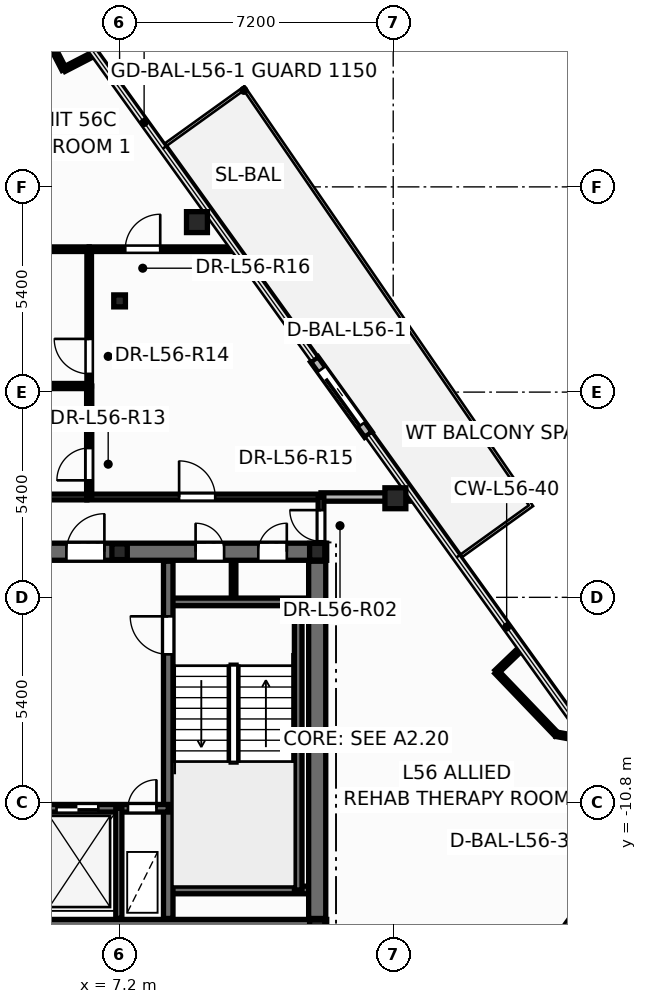
"""IFC4 building model, lengths in metres.
Left out: names, types, materials, properties, quantities, classifications, styles, units other than length and angle.
Written with IfcOpenShell. Run it as: python <this file> out.ifc"""

import sys

from ifc_helpers import new_model, si_unit, direction, frame, frame_2d, origin, origin_2d, place, context, subcontext, project, spatial, rectangle, hollow_circle, i_section, extrude, element, fill, save


model = new_model("IFC4")
c1 = context("Model", 3, precision=1e-05, world=origin(), true_north=direction((0.0, 1.0)))
c2 = subcontext(c1, "Body", "Model", "MODEL_VIEW")
j1 = project(units=[si_unit("LENGTHUNIT", "METRE"), si_unit("PLANEANGLEUNIT", "RADIAN")], contexts=[c1])
p1 = place(None, origin())
s1 = spatial("IfcSite", under=j1, at=p1, CompositionType="ELEMENT")
p2 = place(p1, origin())
s2 = spatial("IfcBuilding", under=s1, at=p2, CompositionType="ELEMENT")
p3 = place(p2, frame((0.0, 0.0, 214.5)))
s3 = spatial("IfcBuildingStorey", under=s2, at=p3, CompositionType="ELEMENT", Elevation=214.5)
for number, where, z_axis, x_axis in (
    (1, (14.457, -2.793, 0.0), (0.0, 0.0, 1.0), (1.0, 0.0, 0.0)),
    (2, (9.236, 4.473, 0.0), (0.0, 0.0, 1.0), (1.0, 0.0, 0.0)),
):
    element("IfcColumn", number, at=place(p3, frame(where, z_axis=z_axis, x_axis=x_axis)), inside=s3, PredefinedType="COLUMN", context=c2, shape_type="SweptSolid", body=[
        extrude(hollow_circle(Radius=0.275, WallThickness=0.024, at=origin_2d()), origin(), (0.0, 0.0, 1.0), 3.6),
    ])
for number, where, z_axis, x_axis in (
    (3, (12.4, -14.1, 0.0), (0.0, 0.0, 1.0), (1.0, 0.0, 0.0)),
    (4, (12.4, -4.2, 0.0), (0.0, 0.0, 1.0), (1.0, 0.0, 0.0)),
):
    element("IfcColumn", number, at=place(p3, frame(where, z_axis=z_axis, x_axis=x_axis)), inside=s3, PredefinedType="COLUMN", context=c2, shape_type="SweptSolid", body=[
        extrude(i_section(OverallWidth=0.4, OverallDepth=0.44, WebThickness=0.028, FlangeThickness=0.04, at=origin_2d()), origin(), (0.0, 0.0, 1.0), 3.6),
    ])
p4 = place(p3, frame((7.2, -4.2, 0.0), z_axis=(0.0, 0.0, 1.0), x_axis=(1.0, 0.0, 0.0)))
e5 = element("IfcColumn", 5, at=p4, inside=s3, PredefinedType="PILASTER", context=c2, shape_type="SweptSolid", body=[
    extrude(i_section(OverallWidth=0.405, OverallDepth=0.414, WebThickness=0.022, FlangeThickness=0.032, at=origin_2d()), origin(), (0.0, 0.0, 1.0), 3.6),
])
p5 = place(p3, frame((7.2, 2.4, 0.0), z_axis=(0.0, 0.0, 1.0), x_axis=(1.0, 0.0, 0.0)))
e6 = element("IfcColumn", 6, at=p5, inside=s3, PredefinedType="COLUMN", context=c2, shape_type="SweptSolid", body=[
    extrude(i_section(OverallWidth=0.307, OverallDepth=0.314, WebThickness=0.012, FlangeThickness=0.019, at=origin_2d()), origin(), (0.0, 0.0, 1.0), 3.6),
])
p6 = place(p3, frame((13.747, -1.12, -0.015), z_axis=(0.0, 0.0, 1.0), x_axis=(-0.58349791381, 0.812114637585, 0.0)))
e7 = element("IfcWall", 7, at=p6, inside=s3, PredefinedType="STANDARD", context=c2, shape_type="SweptSolid", body=[
    extrude(rectangle(XDim=2.44, YDim=0.24, at=frame_2d((1.22, 0.0))), origin(), (0.0, 0.0, 1.0), 2.802),
])
p7 = place(p6, frame((0.32, 0.0, 0.015)))
e8 = element("IfcOpeningElement", 8, at=p7, cuts=e7, PredefinedType="OPENING", context=c2, shape_type="SweptSolid", body=[
    extrude(rectangle(XDim=1.806, YDim=2.204, at=frame_2d((0.9, 1.102))), frame((0.0, 0.13, 0.0), z_axis=(0.0, -1.0, 0.0), x_axis=(1.0, 0.0, 0.0)), (0.0, 0.0, 1.0), 0.26),
])
p8 = place(p3, frame((17.739, -15.864, -0.015), z_axis=(0.0, 0.0, 1.0), x_axis=(0.5835494265, 0.812077623649, 0.0)))
e9 = element("IfcWall", 9, at=p8, inside=s3, PredefinedType="STANDARD", context=c2, shape_type="SweptSolid", body=[
    extrude(rectangle(XDim=3.833, YDim=0.24, at=frame_2d((1.917, 0.0))), origin(), (0.0, 0.0, 1.0), 2.802),
])
p9 = place(p8, frame((2.013, 0.0, 0.015)))
e10 = element("IfcOpeningElement", 10, at=p9, cuts=e9, PredefinedType="OPENING", context=c2, shape_type="SweptSolid", body=[
    extrude(rectangle(XDim=1.506, YDim=2.204, at=frame_2d((0.75, 1.102))), frame((0.0, 0.13, 0.0), z_axis=(0.0, -1.0, 0.0), x_axis=(1.0, 0.0, 0.0)), (0.0, 0.0, 1.0), 0.26),
])
p10 = place(p3, frame((10.2, -5.52, 0.0), z_axis=(0.0, 0.0, 1.0), x_axis=(0.0, 1.0, 0.0)))
e11 = element("IfcWall", 11, at=p10, inside=s3, PredefinedType="PARTITIONING", context=c2, shape_type="SweptSolid", body=[
    extrude(rectangle(XDim=1.12, YDim=0.12, at=frame_2d((0.56, 0.0))), origin(), (0.0, 0.0, 1.0), 3.345),
])
p11 = place(p3, frame((-12.65, -14.1, 0.0), z_axis=(0.0, 0.0, 1.0), x_axis=(1.0, 0.0, 0.0)))
e12 = element("IfcWall", 12, at=p11, inside=s3, PredefinedType="SHEAR", context=c2, shape_type="SweptSolid", body=[
    extrude(rectangle(XDim=25.3, YDim=0.45, at=frame_2d((12.65, 0.0))), origin(), (0.0, 0.0, 1.0), 3.6),
])
p12 = place(p3, frame((-12.65, -4.2, 0.0), z_axis=(0.0, 0.0, 1.0), x_axis=(1.0, 0.0, 0.0)))
e13 = element("IfcWall", 13, at=p12, inside=s3, PredefinedType="SHEAR", context=c2, shape_type="SweptSolid", body=[
    extrude(rectangle(XDim=25.3, YDim=0.45, at=frame_2d((12.65, 0.0))), origin(), (0.0, 0.0, 1.0), 3.6),
])
p13 = place(p12, frame((0.95, 0.0, 0.0)))
e14 = element("IfcOpeningElement", 14, at=p13, cuts=e13, PredefinedType="OPENING", context=c2, shape_type="SweptSolid", body=[
    extrude(rectangle(XDim=0.756, YDim=2.054, at=frame_2d((0.375, 1.027))), frame((0.0, 0.235, 0.0), z_axis=(0.0, -1.0, 0.0), x_axis=(1.0, 0.0, 0.0)), (0.0, 0.0, 1.0), 0.47),
])
p14 = place(p12, frame((2.6, 0.0, 0.0)))
e15 = element("IfcOpeningElement", 15, at=p14, cuts=e13, PredefinedType="OPENING", context=c2, shape_type="SweptSolid", body=[
    extrude(rectangle(XDim=0.756, YDim=2.054, at=frame_2d((0.375, 1.027))), frame((0.0, 0.235, 0.0), z_axis=(0.0, -1.0, 0.0), x_axis=(1.0, 0.0, 0.0)), (0.0, 0.0, 1.0), 0.47),
])
p15 = place(p12, frame((21.85, 0.0, 0.0)))
e16 = element("IfcOpeningElement", 16, at=p15, cuts=e13, PredefinedType="OPENING", context=c2, shape_type="SweptSolid", body=[
    extrude(rectangle(XDim=0.756, YDim=2.054, at=frame_2d((0.375, 1.027))), frame((0.0, 0.235, 0.0), z_axis=(0.0, -1.0, 0.0), x_axis=(1.0, 0.0, 0.0)), (0.0, 0.0, 1.0), 0.47),
])
p16 = place(p12, frame((23.5, 0.0, 0.0)))
e17 = element("IfcOpeningElement", 17, at=p16, cuts=e13, PredefinedType="OPENING", context=c2, shape_type="SweptSolid", body=[
    extrude(rectangle(XDim=0.756, YDim=2.054, at=frame_2d((0.375, 1.027))), frame((0.0, 0.235, 0.0), z_axis=(0.0, -1.0, 0.0), x_axis=(1.0, 0.0, 0.0)), (0.0, 0.0, 1.0), 0.47),
])
p17 = place(p12, frame((5.85, 0.0, 0.0)))
e18 = element("IfcOpeningElement", 18, at=p17, cuts=e13, PredefinedType="OPENING", context=c2, shape_type="SweptSolid", body=[
    extrude(rectangle(XDim=1.006, YDim=2.104, at=frame_2d((0.5, 1.052))), frame((0.0, 0.235, 0.0), z_axis=(0.0, -1.0, 0.0), x_axis=(1.0, 0.0, 0.0)), (0.0, 0.0, 1.0), 0.47),
])
p18 = place(p12, frame((10.35, 0.0, 0.0)))
e19 = element("IfcOpeningElement", 19, at=p18, cuts=e13, PredefinedType="OPENING", context=c2, shape_type="SweptSolid", body=[
    extrude(rectangle(XDim=1.406, YDim=2.154, at=frame_2d((0.7, 1.077))), frame((0.0, 0.235, 0.0), z_axis=(0.0, -1.0, 0.0), x_axis=(1.0, 0.0, 0.0)), (0.0, 0.0, 1.0), 0.47),
])
p19 = place(p12, frame((18.45, 0.0, 0.0)))
e20 = element("IfcOpeningElement", 20, at=p19, cuts=e13, PredefinedType="OPENING", context=c2, shape_type="SweptSolid", body=[
    extrude(rectangle(XDim=1.006, YDim=2.104, at=frame_2d((0.5, 1.052))), frame((0.0, 0.235, 0.0), z_axis=(0.0, -1.0, 0.0), x_axis=(1.0, 0.0, 0.0)), (0.0, 0.0, 1.0), 0.47),
])
for number, where, z_axis, x_axis in (
    (21, (8.48, -5.52, 0.0), (0.0, 0.0, 1.0), (1.0, 0.0, 0.0)),
    (22, (8.48, -13.1, 0.0), (0.0, 0.0, 1.0), (1.0, 0.0, 0.0)),
):
    element("IfcWall", number, at=place(p3, frame(where, z_axis=z_axis, x_axis=x_axis)), inside=s3, PredefinedType="SOLIDWALL", context=c2, shape_type="SweptSolid", body=[
        extrude(rectangle(XDim=3.87, YDim=0.2, at=frame_2d((1.935, 0.0))), origin(), (0.0, 0.0, 1.0), 3.6),
    ])
p20 = place(p3, frame((11.9, -13.1, 0.0), z_axis=(0.0, 0.0, 1.0), x_axis=(0.0, 1.0, 0.0)))
e23 = element("IfcWall", 23, at=p20, inside=s3, PredefinedType="SOLIDWALL", context=c2, shape_type="SweptSolid", body=[
    extrude(rectangle(XDim=7.58, YDim=0.2, at=frame_2d((3.79, 0.0))), origin(), (0.0, 0.0, 1.0), 3.6),
])
p21 = place(p3, frame((8.48, -13.85, 0.0), z_axis=(0.0, 0.0, 1.0), x_axis=(0.0, 1.0, 0.0)))
e24 = element("IfcWall", 24, at=p21, inside=s3, PredefinedType="SHEAR", context=c2, shape_type="SweptSolid", body=[
    extrude(rectangle(XDim=9.4, YDim=0.25, at=frame_2d((4.7, 0.0))), origin(), (0.0, 0.0, 1.0), 3.6),
])
p22 = place(p21, frame((6.95, 0.0, 0.0)))
e25 = element("IfcOpeningElement", 25, at=p22, cuts=e24, PredefinedType="OPENING", context=c2, shape_type="SweptSolid", body=[
    extrude(rectangle(XDim=1.006, YDim=2.104, at=frame_2d((0.5, 1.052))), frame((0.0, 0.135, 0.0), z_axis=(0.0, -1.0, 0.0), x_axis=(1.0, 0.0, 0.0)), (0.0, 0.0, 1.0), 0.27),
])
p23 = place(p3, frame((5.12, -10.95, 0.0), z_axis=(0.0, 0.0, 1.0), x_axis=(1.0, 0.0, 0.0)))
e26 = element("IfcWall", 26, at=p23, inside=s3, PredefinedType="SOLIDWALL", context=c2, shape_type="SweptSolid", body=[
    extrude(rectangle(XDim=3.36, YDim=0.2, at=frame_2d((1.68, 0.0))), origin(), (0.0, 0.0, 1.0), 3.6),
])
p24 = place(p23, frame((0.42, 0.0, 0.0)))
e27 = element("IfcOpeningElement", 27, at=p24, cuts=e26, PredefinedType="OPENING", context=c2, shape_type="SweptSolid", body=[
    extrude(rectangle(XDim=1.106, YDim=2.104, at=frame_2d((0.55, 1.052))), frame((0.0, 0.11, 0.0), z_axis=(0.0, -1.0, 0.0), x_axis=(1.0, 0.0, 0.0)), (0.0, 0.0, 1.0), 0.22),
])
p25 = place(p23, frame((2.3, 0.0, 0.0)))
e28 = element("IfcOpeningElement", 28, at=p25, cuts=e26, PredefinedType="OPENING", context=c2, shape_type="SweptSolid", body=[
    extrude(rectangle(XDim=0.756, YDim=2.054, at=frame_2d((0.375, 1.027))), frame((0.0, 0.11, 0.0), z_axis=(0.0, -1.0, 0.0), x_axis=(1.0, 0.0, 0.0)), (0.0, 0.0, 1.0), 0.22),
])
p26 = place(p3, frame((7.18, -13.85, 0.0), z_axis=(0.0, 0.0, 1.0), x_axis=(0.0, 1.0, 0.0)))
e29 = element("IfcWall", 29, at=p26, inside=s3, PredefinedType="PARTITIONING", context=c2, shape_type="SweptSolid", body=[
    extrude(rectangle(XDim=2.9, YDim=0.16, at=frame_2d((1.45, 0.0))), origin(), (0.0, 0.0, 1.0), 2.47),
])
p27 = place(p3, frame((12.4, -13.85, 0.0), z_axis=(0.0, 0.0, 1.0), x_axis=(0.0, 1.0, 0.0)))
e30 = element("IfcWall", 30, at=p27, inside=s3, PredefinedType="SHEAR", context=c2, shape_type="SweptSolid", body=[
    extrude(rectangle(XDim=9.4, YDim=0.45, at=frame_2d((4.7, 0.0))), origin(), (0.0, 0.0, 1.0), 3.6),
])
p28 = place(p3, frame((6.34, -2.76, 0.0), z_axis=(0.0, 0.0, 1.0), x_axis=(1.0, 0.0, 0.0)))
e31 = element("IfcWall", 31, at=p28, inside=s3, PredefinedType="PARTITIONING", context=c2, shape_type="SweptSolid", body=[
    extrude(rectangle(XDim=6.16, YDim=0.15, at=frame_2d((3.08, 0.0))), origin(), (0.0, 0.0, 1.0), 2.32),
])
p29 = place(p28, frame((2.426, 0.0, 0.0)))
e32 = element("IfcOpeningElement", 32, at=p29, cuts=e31, PredefinedType="OPENING", context=c2, shape_type="SweptSolid", body=[
    extrude(rectangle(XDim=0.956, YDim=2.104, at=frame_2d((0.475, 1.052))), frame((0.0, 0.085, 0.0), z_axis=(0.0, -1.0, 0.0), x_axis=(1.0, 0.0, 0.0)), (0.0, 0.0, 1.0), 0.17),
])
p30 = place(p3, frame((6.4, 3.76, 0.0), z_axis=(0.0, 0.0, 1.0), x_axis=(1.0, 0.0, 0.0)))
e33 = element("IfcWall", 33, at=p30, inside=s3, PredefinedType="PARTITIONING", context=c2, shape_type="SweptSolid", body=[
    extrude(rectangle(XDim=3.841, YDim=0.12, at=frame_2d((1.92, 0.0))), origin(), (0.0, 0.0, 1.0), 2.32),
])
p31 = place(p30, frame((0.949, 0.0, 0.0)))
e34 = element("IfcOpeningElement", 34, at=p31, cuts=e33, PredefinedType="OPENING", context=c2, shape_type="SweptSolid", body=[
    extrude(rectangle(XDim=0.926, YDim=2.104, at=frame_2d((0.46, 1.052))), frame((0.0, 0.07, 0.0), z_axis=(0.0, -1.0, 0.0), x_axis=(1.0, 0.0, 0.0)), (0.0, 0.0, 1.0), 0.14),
])
p32 = place(p3, frame((-0.5, 3.76, 0.0), z_axis=(0.0, 0.0, 1.0), x_axis=(1.0, 0.0, 0.0)))
e35 = element("IfcWall", 35, at=p32, inside=s3, PredefinedType="PARTITIONING", context=c2, shape_type="SweptSolid", body=[
    extrude(rectangle(XDim=6.9, YDim=0.12, at=frame_2d((3.45, 0.0))), origin(), (0.0, 0.0, 1.0), 2.32),
])
p33 = place(p3, frame((6.4, 0.16, 0.0), z_axis=(0.0, 0.0, 1.0), x_axis=(0.0, 1.0, 0.0)))
e36 = element("IfcWall", 36, at=p33, inside=s3, PredefinedType="PARTITIONING", context=c2, shape_type="SweptSolid", body=[
    extrude(rectangle(XDim=3.6, YDim=0.12, at=frame_2d((1.8, 0.0))), origin(), (0.0, 0.0, 1.0), 2.32),
])
p34 = place(p33, frame((0.32, 0.0, 0.0)))
e37 = element("IfcOpeningElement", 37, at=p34, cuts=e36, PredefinedType="OPENING", context=c2, shape_type="SweptSolid", body=[
    extrude(rectangle(XDim=0.926, YDim=2.104, at=frame_2d((0.46, 1.052))), frame((0.0, 0.07, 0.0), z_axis=(0.0, -1.0, 0.0), x_axis=(1.0, 0.0, 0.0)), (0.0, 0.0, 1.0), 0.14),
])
p35 = place(p3, frame((6.4, -2.76, 0.0), z_axis=(0.0, 0.0, 1.0), x_axis=(0.0, 1.0, 0.0)))
e38 = element("IfcWall", 38, at=p35, inside=s3, PredefinedType="PARTITIONING", context=c2, shape_type="SweptSolid", body=[
    extrude(rectangle(XDim=2.92, YDim=0.135, at=frame_2d((1.46, 0.0))), origin(), (0.0, 0.0, 1.0), 3.345),
])
p36 = place(p35, frame((0.438, 0.0, 0.0)))
e39 = element("IfcOpeningElement", 39, at=p36, cuts=e38, PredefinedType="OPENING", context=c2, shape_type="SweptSolid", body=[
    extrude(rectangle(XDim=0.856, YDim=2.104, at=frame_2d((0.425, 1.052))), frame((0.0, 0.078, 0.0), z_axis=(0.0, -1.0, 0.0), x_axis=(1.0, 0.0, 0.0)), (0.0, 0.0, 1.0), 0.155),
])
p37 = place(p3, frame((3.862, -2.76, 0.0), z_axis=(0.0, 0.0, 1.0), x_axis=(1.0, 0.0, 0.0)))
e40 = element("IfcWall", 40, at=p37, inside=s3, PredefinedType="PARTITIONING", context=c2, shape_type="SweptSolid", body=[
    extrude(rectangle(XDim=2.476, YDim=0.15, at=frame_2d((1.238, 0.0))), origin(), (0.0, 0.0, 1.0), 3.345),
])
p38 = place(p3, frame((3.8, 0.16, 0.0), z_axis=(0.0, 0.0, 1.0), x_axis=(1.0, 0.0, 0.0)))
e41 = element("IfcWall", 41, at=p38, inside=s3, PredefinedType="PARTITIONING", context=c2, shape_type="SweptSolid", body=[
    extrude(rectangle(XDim=2.6, YDim=0.135, at=frame_2d((1.3, 0.0))), origin(), (0.0, 0.0, 1.0), 3.345),
])
p39 = place(p3, frame((12.5, -2.76, 0.0), z_axis=(0.0, 0.0, 1.0), x_axis=(1.0, 0.0, 0.0)))
e42 = element("IfcWall", 42, at=p39, inside=s3, PredefinedType="PARTITIONING", context=c2, shape_type="SweptSolid", body=[
    extrude(rectangle(XDim=2.426, YDim=0.22, at=frame_2d((1.213, 0.0))), origin(), (0.0, 0.0, 1.0), 2.32),
])
p40 = place(p3, frame((5.738, 8.492, 0.0), z_axis=(0.0, 0.0, 1.0), x_axis=(-0.458778031793, 0.888550908808, 0.0)))
e43 = element("IfcWall", 43, at=p40, inside=s3, PredefinedType="PARTITIONING", context=c2, shape_type="SweptSolid", body=[
    extrude(rectangle(XDim=2.163, YDim=0.12, at=frame_2d((1.082, 0.0))), origin(), (0.0, 0.0, 1.0), 3.345),
])
p41 = place(p3, frame((18.694, -9.004, 0.0), z_axis=(0.0, 0.0, 1.0), x_axis=(-0.691975296368, 0.721921179366, 0.0)))
e44 = element("IfcWall", 44, at=p41, inside=s3, PredefinedType="PARTITIONING", context=c2, shape_type="SweptSolid", body=[
    extrude(rectangle(XDim=2.275, YDim=0.12, at=frame_2d((1.137, 0.0))), origin(), (0.0, 0.0, 1.0), 3.345),
])
p42 = place(p3, frame((12.5, -4.24, 0.0), z_axis=(0.0, 0.0, 1.0), x_axis=(0.0, 1.0, 0.0)))
e45 = element("IfcWall", 45, at=p42, inside=s3, PredefinedType="PARTITIONING", context=c2, shape_type="SweptSolid", body=[
    extrude(rectangle(XDim=1.48, YDim=0.15, at=frame_2d((0.74, 0.0))), origin(), (0.0, 0.0, 1.0), 2.32),
])
p43 = place(p42, frame((0.315, 0.0, 0.0)))
e46 = element("IfcOpeningElement", 46, at=p43, cuts=e45, PredefinedType="OPENING", context=c2, shape_type="SweptSolid", body=[
    extrude(rectangle(XDim=0.826, YDim=2.104, at=frame_2d((0.41, 1.052))), frame((0.0, 0.085, 0.0), z_axis=(0.0, -1.0, 0.0), x_axis=(1.0, 0.0, 0.0)), (0.0, 0.0, 1.0), 0.17),
])
p44 = place(p3, frame((17.12, -7.362, 0.0), z_axis=(0.0, 0.0, 1.0), x_axis=(0.721695363455, 0.692210807751, 0.0)))
e47 = element("IfcWall", 47, at=p44, inside=s3, PredefinedType="PARTITIONING", context=c2, shape_type="SweptSolid", body=[
    extrude(rectangle(XDim=0.903, YDim=0.12, at=frame_2d((0.451, 0.0))), origin(), (0.0, 0.0, 1.0), 2.787),
])
p45 = place(p3, frame((6.533, 8.903, 0.0), z_axis=(0.0, 0.0, 1.0), x_axis=(-0.888513036459, -0.458851374677, 0.0)))
e48 = element("IfcWall", 48, at=p45, inside=s3, PredefinedType="PARTITIONING", context=c2, shape_type="SweptSolid", body=[
    extrude(rectangle(XDim=0.895, YDim=0.12, at=frame_2d((0.448, 0.0))), origin(), (0.0, 0.0, 1.0), 2.787),
])
p46 = place(p3, frame((19.507, -9.153, 0.0), z_axis=(0.0, 0.0, 1.0), x_axis=(-0.983694613694, 0.179846898751, 0.0)))
e49 = element("IfcWall", 49, at=p46, inside=s3, PredefinedType="PARTITIONING", context=c2, shape_type="SweptSolid", body=[
    extrude(rectangle(XDim=0.827, YDim=0.12, at=frame_2d((0.413, 0.0))), origin(), (0.0, 0.0, 1.0), 2.787),
])
p47 = place(p7, origin())
e50 = element("IfcDoor", 50, at=p47, inside=s3, OperationType="SLIDING_TO_LEFT", PredefinedType="DOOR", context=c2, shape_type="SweptSolid", body=[
    extrude(rectangle(XDim=1.8, YDim=2.2, at=frame_2d((0.9, 1.1))), frame((0.0, 0.025, 0.0), z_axis=(0.0, -1.0, 0.0), x_axis=(1.0, 0.0, 0.0)), (0.0, 0.0, 1.0), 0.05),
])
fill(e8, e50)
p48 = place(p9, origin())
e51 = element("IfcDoor", 51, at=p48, inside=s3, OperationType="SLIDING_TO_RIGHT", PredefinedType="DOOR", context=c2, shape_type="SweptSolid", body=[
    extrude(rectangle(XDim=1.5, YDim=2.2, at=frame_2d((0.75, 1.1))), frame((0.0, 0.025, 0.0), z_axis=(0.0, -1.0, 0.0), x_axis=(1.0, 0.0, 0.0)), (0.0, 0.0, 1.0), 0.05),
])
fill(e10, e51)
p49 = place(p22, origin())
e52 = element("IfcDoor", 52, at=p49, inside=s3, OperationType="SINGLE_SWING_RIGHT", PredefinedType="DOOR", context=c2, shape_type="SweptSolid", body=[
    extrude(rectangle(XDim=1.0, YDim=2.1, at=frame_2d((0.5, 1.05))), frame((0.0, 0.025, 0.0), z_axis=(0.0, -1.0, 0.0), x_axis=(1.0, 0.0, 0.0)), (0.0, 0.0, 1.0), 0.05),
])
fill(e25, e52)
p50 = place(p24, origin())
e53 = element("IfcDoor", 53, at=p50, inside=s3, OperationType="DOUBLE_DOOR_SLIDING", PredefinedType="DOOR", context=c2, shape_type="SweptSolid", body=[
    extrude(rectangle(XDim=1.1, YDim=2.1, at=frame_2d((0.55, 1.05))), frame((0.0, 0.025, 0.0), z_axis=(0.0, -1.0, 0.0), x_axis=(1.0, 0.0, 0.0)), (0.0, 0.0, 1.0), 0.05),
])
fill(e27, e53)
p51 = place(p25, origin())
e54 = element("IfcDoor", 54, at=p51, inside=s3, OperationType="SINGLE_SWING_RIGHT", PredefinedType="DOOR", context=c2, shape_type="SweptSolid", body=[
    extrude(rectangle(XDim=0.75, YDim=2.05, at=frame_2d((0.375, 1.025))), frame((0.0, 0.025, 0.0), z_axis=(0.0, -1.0, 0.0), x_axis=(1.0, 0.0, 0.0)), (0.0, 0.0, 1.0), 0.05),
])
fill(e28, e54)
p52 = place(p15, origin())
e55 = element("IfcDoor", 55, at=p52, inside=s3, OperationType="SINGLE_SWING_LEFT", PredefinedType="DOOR", context=c2, shape_type="SweptSolid", body=[
    extrude(rectangle(XDim=0.75, YDim=2.05, at=frame_2d((0.375, 1.025))), frame((0.0, 0.025, 0.0), z_axis=(0.0, -1.0, 0.0), x_axis=(1.0, 0.0, 0.0)), (0.0, 0.0, 1.0), 0.05),
])
fill(e16, e55)
p53 = place(p16, origin())
e56 = element("IfcDoor", 56, at=p53, inside=s3, OperationType="SINGLE_SWING_RIGHT", PredefinedType="DOOR", context=c2, shape_type="SweptSolid", body=[
    extrude(rectangle(XDim=0.75, YDim=2.05, at=frame_2d((0.375, 1.025))), frame((0.0, 0.025, 0.0), z_axis=(0.0, -1.0, 0.0), x_axis=(1.0, 0.0, 0.0)), (0.0, 0.0, 1.0), 0.05),
])
fill(e17, e56)
p54 = place(p19, origin())
e57 = element("IfcDoor", 57, at=p54, inside=s3, OperationType="SINGLE_SWING_RIGHT", PredefinedType="DOOR", context=c2, shape_type="SweptSolid", body=[
    extrude(rectangle(XDim=1.0, YDim=2.1, at=frame_2d((0.5, 1.05))), frame((0.0, 0.025, 0.0), z_axis=(0.0, -1.0, 0.0), x_axis=(1.0, 0.0, 0.0)), (0.0, 0.0, 1.0), 0.05),
])
fill(e20, e57)
p55 = place(p43, origin())
e58 = element("IfcDoor", 58, at=p55, inside=s3, OperationType="SINGLE_SWING_RIGHT", PredefinedType="DOOR", context=c2, shape_type="SweptSolid", body=[
    extrude(rectangle(XDim=0.82, YDim=2.1, at=frame_2d((0.41, 1.05))), frame((0.0, 0.025, 0.0), z_axis=(0.0, -1.0, 0.0), x_axis=(1.0, 0.0, 0.0)), (0.0, 0.0, 1.0), 0.05),
])
fill(e46, e58)
p56 = place(p36, origin())
e59 = element("IfcDoor", 59, at=p56, inside=s3, OperationType="SINGLE_SWING_LEFT", PredefinedType="DOOR", context=c2, shape_type="SweptSolid", body=[
    extrude(rectangle(XDim=0.85, YDim=2.1, at=frame_2d((0.425, 1.05))), frame((0.0, 0.025, 0.0), z_axis=(0.0, -1.0, 0.0), x_axis=(1.0, 0.0, 0.0)), (0.0, 0.0, 1.0), 0.05),
])
fill(e39, e59)
p57 = place(p34, origin())
e60 = element("IfcDoor", 60, at=p57, inside=s3, OperationType="SINGLE_SWING_RIGHT", PredefinedType="DOOR", context=c2, shape_type="SweptSolid", body=[
    extrude(rectangle(XDim=0.92, YDim=2.1, at=frame_2d((0.46, 1.05))), frame((0.0, 0.025, 0.0), z_axis=(0.0, -1.0, 0.0), x_axis=(1.0, 0.0, 0.0)), (0.0, 0.0, 1.0), 0.05),
])
fill(e37, e60)
p58 = place(p29, origin())
e61 = element("IfcDoor", 61, at=p58, inside=s3, OperationType="SINGLE_SWING_LEFT", PredefinedType="DOOR", context=c2, shape_type="SweptSolid", body=[
    extrude(rectangle(XDim=0.95, YDim=2.1, at=frame_2d((0.475, 1.05))), frame((0.0, 0.025, 0.0), z_axis=(0.0, -1.0, 0.0), x_axis=(1.0, 0.0, 0.0)), (0.0, 0.0, 1.0), 0.05),
])
fill(e32, e61)
p59 = place(p31, origin())
e62 = element("IfcDoor", 62, at=p59, inside=s3, OperationType="SINGLE_SWING_RIGHT", PredefinedType="DOOR", context=c2, shape_type="SweptSolid", body=[
    extrude(rectangle(XDim=0.92, YDim=2.1, at=frame_2d((0.46, 1.05))), frame((0.0, 0.025, 0.0), z_axis=(0.0, -1.0, 0.0), x_axis=(1.0, 0.0, 0.0)), (0.0, 0.0, 1.0), 0.05),
])
fill(e34, e62)
save(model, sys.argv[1])
